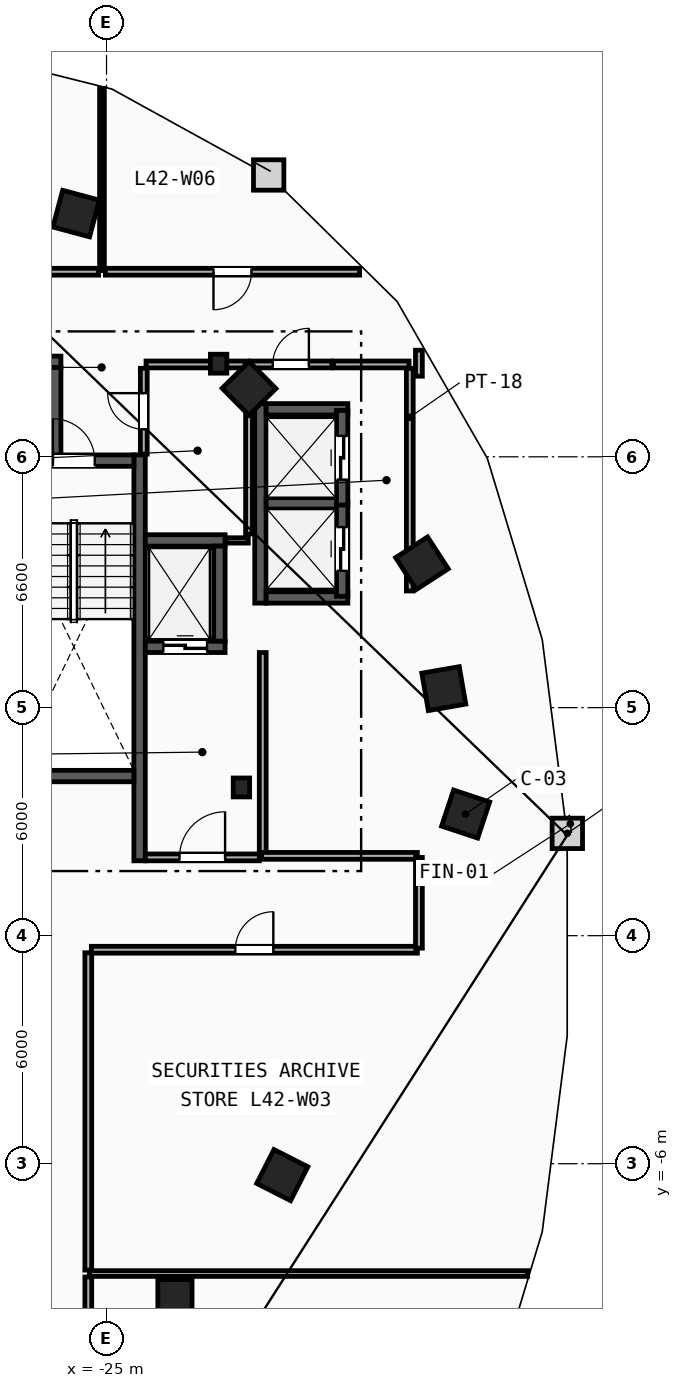
"""IFC4 building model, lengths in metres.
Left out: names, types, materials, properties, quantities, classifications, styles, units other than length and angle.
Written with IfcOpenShell. Run it as: python <this file> out.ifc"""

import sys

from ifc_helpers import new_model, si_unit, direction, frame, frame_2d, origin, origin_2d, place, context, subcontext, project, spatial, rectangle, i_section, extrude, element, fill, save


model = new_model("IFC4")
c1 = context("Model", 3, precision=1e-05, world=origin(), true_north=direction((0.0, 1.0)))
c2 = subcontext(c1, "Body", "Model", "MODEL_VIEW")
j1 = project(units=[si_unit("LENGTHUNIT", "METRE"), si_unit("PLANEANGLEUNIT", "RADIAN")], contexts=[c1])
p1 = place(None, origin())
s1 = spatial("IfcSite", under=j1, at=p1, CompositionType="ELEMENT")
p2 = place(p1, origin())
s2 = spatial("IfcBuilding", under=s1, at=p2, CompositionType="ELEMENT")
p3 = place(p2, frame((0.0, 0.0, 162.0)))
s3 = spatial("IfcBuildingStorey", under=s2, at=p3, CompositionType="ELEMENT", Elevation=162.0)
for number, where, z_axis, x_axis in (
    (1, (-21.45, 3.9, 0.0), (0.0, 0.0, 1.0), (1.0, 0.0, 0.0)),
    (2, (-22.05, 15.05, 0.0), (0.0, 0.0, 1.0), (1.0, 0.0, 0.0)),
):
    element("IfcColumn", number, at=place(p3, frame(where, z_axis=z_axis, x_axis=x_axis)), inside=s3, PredefinedType="COLUMN", context=c2, shape_type="SweptSolid", body=[
        extrude(i_section(OverallWidth=0.432, OverallDepth=0.498, WebThickness=0.056, FlangeThickness=0.089, FilletRadius=0.018, at=origin_2d()), origin(), (0.0, 0.0, 1.0), 3.6),
    ])
p4 = place(p3, frame((-23.2, -9.5, 0.0), z_axis=(0.0, 0.0, 1.0), x_axis=(1.0, 0.0, 0.0)))
e3 = element("IfcColumn", 3, at=p4, inside=s3, PredefinedType="COLUMN", context=c2, shape_type="SweptSolid", body=[
    extrude(rectangle(XDim=0.9, YDim=0.9, at=origin_2d()), origin(), (0.0, 0.0, 1.0), 3.6),
])
for number, where, z_axis, x_axis in (
    (4, (-15.55, 3.2, 0.0), (0.0, 0.0, 1.0), (0.315, 0.949, 0.0)),
    (5, (-16.125, 6.5, 0.0), (0.0, 0.0, 1.0), (-0.172, 0.985, 0.0)),
    (6, (-16.7, 9.8, 0.0), (0.0, 0.0, 1.0), (-0.544, 0.839, 0.0)),
    (7, (-21.25, 14.4, 0.0), (0.0, 0.0, 1.0), (-0.703, 0.711, 0.0)),
    (8, (-25.8, 19.0, 0.0), (0.0, 0.0, 1.0), (-0.966, 0.259, 0.0)),
    (9, (-20.375, -6.3, 0.0), (0.0, 0.0, 1.0), (0.453, 0.892, 0.0)),
):
    element("IfcColumn", number, at=place(p3, frame(where, z_axis=z_axis, x_axis=x_axis)), inside=s3, PredefinedType="COLUMN", context=c2, shape_type="SweptSolid", body=[
        extrude(rectangle(XDim=1.0, YDim=1.0, at=origin_2d()), origin(), (0.0, 0.0, 1.0), 3.6),
    ])
p5 = place(p3, frame((-24.13, 1.97, 0.0), z_axis=(0.0, 0.0, 1.0), x_axis=(0.0, 1.0, 0.0)))
e10 = element("IfcWall", 10, at=p5, inside=s3, PredefinedType="SHEAR", context=c2, shape_type="SweptSolid", body=[
    extrude(rectangle(XDim=10.68, YDim=0.3, at=frame_2d((5.34, 0.0))), origin(), (0.0, 0.0, 1.0), 3.36),
])
p6 = place(p3, frame((-27.44, 12.5, 0.0), z_axis=(0.0, 0.0, 1.0), x_axis=(1.0, 0.0, 0.0)))
e11 = element("IfcWall", 11, at=p6, inside=s3, PredefinedType="SHEAR", context=c2, shape_type="SweptSolid", body=[
    extrude(rectangle(XDim=3.16, YDim=0.3, at=frame_2d((1.58, 0.0))), origin(), (0.0, 0.0, 1.0), 3.36),
])
p7 = place(p6, frame((1.03, 0.0, 0.0)))
e12 = element("IfcOpeningElement", 12, at=p7, cuts=e11, PredefinedType="OPENING", context=c2, shape_type="SweptSolid", body=[
    extrude(rectangle(XDim=1.1, YDim=2.15, at=frame_2d((0.55, 1.075))), frame((0.0, 0.16, 0.0), z_axis=(0.0, -1.0, 0.0), x_axis=(1.0, 0.0, 0.0)), (0.0, 0.0, 1.0), 0.32),
])
p8 = place(p3, frame((-27.44, 4.2, 0.0), z_axis=(0.0, 0.0, 1.0), x_axis=(1.0, 0.0, 0.0)))
e13 = element("IfcWall", 13, at=p8, inside=s3, PredefinedType="SHEAR", context=c2, shape_type="SweptSolid", body=[
    extrude(rectangle(XDim=3.16, YDim=0.3, at=frame_2d((1.58, 0.0))), origin(), (0.0, 0.0, 1.0), 3.36),
])
p9 = place(p3, frame((-20.89, 2.15, 0.0), z_axis=(0.0, 0.0, 1.0), x_axis=(0.0, 1.0, 0.0)))
e14 = element("IfcWall", 14, at=p9, inside=s3, PredefinedType="PARTITIONING", context=c2, shape_type="SweptSolid", body=[
    extrude(rectangle(XDim=5.3, YDim=0.18, at=frame_2d((2.65, 0.0))), origin(), (0.0, 0.0, 1.0), 3.36),
])
p10 = place(p3, frame((-23.98, 2.06, 0.0), z_axis=(0.0, 0.0, 1.0), x_axis=(1.0, 0.0, 0.0)))
e15 = element("IfcWall", 15, at=p10, inside=s3, PredefinedType="PARTITIONING", context=c2, shape_type="SweptSolid", body=[
    extrude(rectangle(XDim=3.0, YDim=0.18, at=frame_2d((1.5, 0.0))), origin(), (0.0, 0.0, 1.0), 3.36),
])
p11 = place(p10, frame((0.9, 0.0, 0.0)))
e16 = element("IfcOpeningElement", 16, at=p11, cuts=e15, PredefinedType="OPENING", context=c2, shape_type="SweptSolid", body=[
    extrude(rectangle(XDim=1.2, YDim=2.15, at=frame_2d((0.6, 1.075))), frame((0.0, 0.1, 0.0), z_axis=(0.0, -1.0, 0.0), x_axis=(1.0, 0.0, 0.0)), (0.0, 0.0, 1.0), 0.2),
])
p12 = place(p3, frame((-23.98, 7.6, 0.0), z_axis=(0.0, 0.0, 1.0), x_axis=(1.0, 0.0, 0.0)))
e17 = element("IfcWall", 17, at=p12, inside=s3, PredefinedType="SHEAR", context=c2, shape_type="SweptSolid", body=[
    extrude(rectangle(XDim=2.1, YDim=0.3, at=frame_2d((1.05, 0.0))), origin(), (0.0, 0.0, 1.0), 3.36),
])
p13 = place(p12, frame((0.475, 0.0, 0.0)))
e18 = element("IfcOpeningElement", 18, at=p13, cuts=e17, PredefinedType="OPENING", context=c2, shape_type="SweptSolid", body=[
    extrude(rectangle(XDim=1.15, YDim=2.2, at=frame_2d((0.575, 1.1))), frame((0.0, 0.16, 0.0), z_axis=(0.0, -1.0, 0.0), x_axis=(1.0, 0.0, 0.0)), (0.0, 0.0, 1.0), 0.32),
])
p14 = place(p3, frame((-23.98, 10.4, 0.0), z_axis=(0.0, 0.0, 1.0), x_axis=(1.0, 0.0, 0.0)))
e19 = element("IfcWall", 19, at=p14, inside=s3, PredefinedType="SHEAR", context=c2, shape_type="SweptSolid", body=[
    extrude(rectangle(XDim=2.1, YDim=0.3, at=frame_2d((1.05, 0.0))), origin(), (0.0, 0.0, 1.0), 3.36),
])
for number, where, z_axis, x_axis in (
    (20, (-22.03, 7.75, 0.0), (0.0, 0.0, 1.0), (0.0, 1.0, 0.0)),
    (21, (-28.7, 15.1, 0.0), (0.0, 0.0, 1.0), (1.0, 0.0, 0.0)),
):
    element("IfcWall", number, at=place(p3, frame(where, z_axis=z_axis, x_axis=x_axis)), inside=s3, PredefinedType="SHEAR", context=c2, shape_type="SweptSolid", body=[
        extrude(rectangle(XDim=2.5, YDim=0.3, at=frame_2d((1.25, 0.0))), origin(), (0.0, 0.0, 1.0), 3.36),
    ])
p15 = place(p3, frame((-26.35, 12.65, 0.0), z_axis=(0.0, 0.0, 1.0), x_axis=(0.0, 1.0, 0.0)))
e22 = element("IfcWall", 22, at=p15, inside=s3, PredefinedType="SHEAR", context=c2, shape_type="SweptSolid", body=[
    extrude(rectangle(XDim=2.3, YDim=0.3, at=frame_2d((1.15, 0.0))), origin(), (0.0, 0.0, 1.0), 3.36),
])
p16 = place(p3, frame((-20.95, 8.75, 0.0), z_axis=(0.0, 0.0, 1.0), x_axis=(0.0, 1.0, 0.0)))
e23 = element("IfcWall", 23, at=p16, inside=s3, PredefinedType="SHEAR", context=c2, shape_type="SweptSolid", body=[
    extrude(rectangle(XDim=5.25, YDim=0.3, at=frame_2d((2.625, 0.0))), origin(), (0.0, 0.0, 1.0), 3.36),
])
for number, where, z_axis, x_axis in (
    (24, (-20.8, 8.9, 0.0), (0.0, 0.0, 1.0), (1.0, 0.0, 0.0)),
    (25, (-20.8, 13.85, 0.0), (0.0, 0.0, 1.0), (1.0, 0.0, 0.0)),
):
    element("IfcWall", number, at=place(p3, frame(where, z_axis=z_axis, x_axis=x_axis)), inside=s3, PredefinedType="SHEAR", context=c2, shape_type="SweptSolid", body=[
        extrude(rectangle(XDim=2.15, YDim=0.3, at=frame_2d((1.075, 0.0))), origin(), (0.0, 0.0, 1.0), 3.36),
    ])
p17 = place(p3, frame((-20.8, 11.375, 0.0), z_axis=(0.0, 0.0, 1.0), x_axis=(1.0, 0.0, 0.0)))
e26 = element("IfcWall", 26, at=p17, inside=s3, PredefinedType="SHEAR", context=c2, shape_type="SweptSolid", body=[
    extrude(rectangle(XDim=1.85, YDim=0.3, at=frame_2d((0.925, 0.0))), origin(), (0.0, 0.0, 1.0), 3.36),
])
p18 = place(p3, frame((-18.8, 8.93, 0.0), z_axis=(0.0, 0.0, 1.0), x_axis=(0.0, 1.0, 0.0)))
e27 = element("IfcWall", 27, at=p18, inside=s3, PredefinedType="SHEAR", context=c2, shape_type="SweptSolid", body=[
    extrude(rectangle(XDim=2.49, YDim=0.3, at=frame_2d((1.245, 0.0))), origin(), (0.0, 0.0, 1.0), 3.36),
])
p19 = place(p18, frame((0.67, 0.0, 0.0)))
e28 = element("IfcOpeningElement", 28, at=p19, cuts=e27, PredefinedType="OPENING", context=c2, shape_type="SweptSolid", body=[
    extrude(rectangle(XDim=1.15, YDim=2.2, at=frame_2d((0.575, 1.1))), frame((0.0, 0.16, 0.0), z_axis=(0.0, -1.0, 0.0), x_axis=(1.0, 0.0, 0.0)), (0.0, 0.0, 1.0), 0.32),
])
p20 = place(p3, frame((-18.8, 11.33, 0.0), z_axis=(0.0, 0.0, 1.0), x_axis=(0.0, 1.0, 0.0)))
e29 = element("IfcWall", 29, at=p20, inside=s3, PredefinedType="SHEAR", context=c2, shape_type="SweptSolid", body=[
    extrude(rectangle(XDim=2.49, YDim=0.3, at=frame_2d((1.245, 0.0))), origin(), (0.0, 0.0, 1.0), 3.36),
])
p21 = place(p20, frame((0.67, 0.0, 0.0)))
e30 = element("IfcOpeningElement", 30, at=p21, cuts=e29, PredefinedType="OPENING", context=c2, shape_type="SweptSolid", body=[
    extrude(rectangle(XDim=1.15, YDim=2.2, at=frame_2d((0.575, 1.1))), frame((0.0, 0.16, 0.0), z_axis=(0.0, -1.0, 0.0), x_axis=(1.0, 0.0, 0.0)), (0.0, 0.0, 1.0), 0.32),
])
p22 = place(p3, frame((-17.02, 9.07, 0.0), z_axis=(0.0, 0.0, 1.0), x_axis=(0.0, 1.0, 0.0)))
e31 = element("IfcWall", 31, at=p22, inside=s3, PredefinedType="PARTITIONING", context=c2, shape_type="SweptSolid", body=[
    extrude(rectangle(XDim=5.86, YDim=0.18, at=frame_2d((2.93, 0.0))), origin(), (0.0, 0.0, 1.0), 3.36),
])
p23 = place(p3, frame((-21.23, 15.03, 0.0), z_axis=(0.0, 0.0, 1.0), x_axis=(1.0, 0.0, 0.0)))
e32 = element("IfcWall", 32, at=p23, inside=s3, PredefinedType="PARTITIONING", context=c2, shape_type="SweptSolid", body=[
    extrude(rectangle(XDim=2.16, YDim=0.18, at=frame_2d((1.08, 0.0))), origin(), (0.0, 0.0, 1.0), 3.36),
])
p24 = place(p23, frame((0.605, 0.0, 0.0)))
e33 = element("IfcOpeningElement", 33, at=p24, cuts=e32, PredefinedType="OPENING", context=c2, shape_type="SweptSolid", body=[
    extrude(rectangle(XDim=0.95, YDim=2.1, at=frame_2d((0.475, 1.05))), frame((0.0, 0.1, 0.0), z_axis=(0.0, -1.0, 0.0), x_axis=(1.0, 0.0, 0.0)), (0.0, 0.0, 1.0), 0.2),
])
p25 = place(p3, frame((-19.03, 15.03, 0.0), z_axis=(0.0, 0.0, 1.0), x_axis=(1.0, 0.0, 0.0)))
e34 = element("IfcWall", 34, at=p25, inside=s3, PredefinedType="PARTITIONING", context=c2, shape_type="SweptSolid", body=[
    extrude(rectangle(XDim=1.99, YDim=0.18, at=frame_2d((0.995, 0.0))), origin(), (0.0, 0.0, 1.0), 3.36),
])
p26 = place(p3, frame((-21.86, 10.4, 0.0), z_axis=(0.0, 0.0, 1.0), x_axis=(1.0, 0.0, 0.0)))
e35 = element("IfcWall", 35, at=p26, inside=s3, PredefinedType="PARTITIONING", context=c2, shape_type="SweptSolid", body=[
    extrude(rectangle(XDim=0.59, YDim=0.14, at=frame_2d((0.295, 0.0))), origin(), (0.0, 0.0, 1.0), 3.36),
])
p27 = place(p3, frame((-21.25, 10.57, 0.0), z_axis=(0.0, 0.0, 1.0), x_axis=(0.0, 1.0, 0.0)))
e36 = element("IfcWall", 36, at=p27, inside=s3, PredefinedType="PARTITIONING", context=c2, shape_type="SweptSolid", body=[
    extrude(rectangle(XDim=4.36, YDim=0.18, at=frame_2d((2.18, 0.0))), origin(), (0.0, 0.0, 1.0), 3.36),
])
p28 = place(p3, frame((-23.96, 15.03, 0.0), z_axis=(0.0, 0.0, 1.0), x_axis=(1.0, 0.0, 0.0)))
e37 = element("IfcWall", 37, at=p28, inside=s3, PredefinedType="PARTITIONING", context=c2, shape_type="SweptSolid", body=[
    extrude(rectangle(XDim=2.61, YDim=0.18, at=frame_2d((1.305, 0.0))), origin(), (0.0, 0.0, 1.0), 2.433),
])
p29 = place(p3, frame((-24.02, 12.67, 0.0), z_axis=(0.0, 0.0, 1.0), x_axis=(0.0, 1.0, 0.0)))
e38 = element("IfcWall", 38, at=p29, inside=s3, PredefinedType="PARTITIONING", context=c2, shape_type="SweptSolid", body=[
    extrude(rectangle(XDim=2.26, YDim=0.18, at=frame_2d((1.13, 0.0))), origin(), (0.0, 0.0, 1.0), 3.36),
])
p30 = place(p29, frame((0.655, 0.0, 0.0)))
e39 = element("IfcOpeningElement", 39, at=p30, cuts=e38, PredefinedType="OPENING", context=c2, shape_type="SweptSolid", body=[
    extrude(rectangle(XDim=0.95, YDim=2.1, at=frame_2d((0.475, 1.05))), frame((0.0, 0.1, 0.0), z_axis=(0.0, -1.0, 0.0), x_axis=(1.0, 0.0, 0.0)), (0.0, 0.0, 1.0), 0.2),
])
p31 = place(p3, frame((-25.45, -8.89, 0.0), z_axis=(0.0, 0.0, 1.0), x_axis=(1.0, 0.0, 0.0)))
e40 = element("IfcWall", 40, at=p31, inside=s3, PredefinedType="PARTITIONING", context=c2, shape_type="SweptSolid", body=[
    extrude(rectangle(XDim=11.532, YDim=0.15, at=frame_2d((5.766, 0.0))), origin(), (0.0, 0.0, 1.0), 3.36),
])
p32 = place(p3, frame((-25.12, 17.5, 0.0), z_axis=(0.0, 0.0, 1.0), x_axis=(0.0, 1.0, 0.0)))
e41 = element("IfcWall", 41, at=p32, inside=s3, PredefinedType="PARTITIONING", context=c2, shape_type="SweptSolid", body=[
    extrude(rectangle(XDim=4.791, YDim=0.125, at=frame_2d((2.396, 0.0))), origin(), (0.0, 0.0, 1.0), 3.36),
])
p33 = place(p3, frame((-25.48, -11.178, 0.0), z_axis=(0.0, 0.0, 1.0), x_axis=(0.0, 1.0, 0.0)))
e42 = element("IfcWall", 42, at=p33, inside=s3, PredefinedType="PARTITIONING", context=c2, shape_type="SweptSolid", body=[
    extrude(rectangle(XDim=2.198, YDim=0.18, at=frame_2d((1.099, 0.0))), origin(), (0.0, 0.0, 1.0), 3.36),
])
p34 = place(p3, frame((-25.4, -0.37, 0.0), z_axis=(0.0, 0.0, 1.0), x_axis=(1.0, 0.0, 0.0)))
e43 = element("IfcWall", 43, at=p34, inside=s3, PredefinedType="PARTITIONING", context=c2, shape_type="SweptSolid", body=[
    extrude(rectangle(XDim=8.578, YDim=0.18, at=frame_2d((4.289, 0.0))), origin(), (0.0, 0.0, 1.0), 3.36),
])
p35 = place(p34, frame((3.789, 0.0, 0.0)))
e44 = element("IfcOpeningElement", 44, at=p35, cuts=e43, PredefinedType="OPENING", context=c2, shape_type="SweptSolid", body=[
    extrude(rectangle(XDim=1.0, YDim=2.15, at=frame_2d((0.5, 1.075))), frame((0.0, 0.1, 0.0), z_axis=(0.0, -1.0, 0.0), x_axis=(1.0, 0.0, 0.0)), (0.0, 0.0, 1.0), 0.2),
])
p36 = place(p3, frame((-25.48, -8.8, 0.0), z_axis=(0.0, 0.0, 1.0), x_axis=(0.0, 1.0, 0.0)))
e45 = element("IfcWall", 45, at=p36, inside=s3, PredefinedType="PARTITIONING", context=c2, shape_type="SweptSolid", body=[
    extrude(rectangle(XDim=8.35, YDim=0.18, at=frame_2d((4.175, 0.0))), origin(), (0.0, 0.0, 1.0), 3.36),
])
p37 = place(p3, frame((-16.822, 2.1, 0.0), z_axis=(0.0, 0.0, 1.0), x_axis=(-1.0, 0.0, 0.0)))
e46 = element("IfcWall", 46, at=p37, inside=s3, PredefinedType="PARTITIONING", context=c2, shape_type="SweptSolid", body=[
    extrude(rectangle(XDim=4.098, YDim=0.18, at=frame_2d((2.049, 0.0))), origin(), (0.0, 0.0, 1.0), 3.36),
])
p38 = place(p3, frame((-16.78, -0.329, 0.0), z_axis=(0.0, 0.0, 1.0), x_axis=(0.0, 1.0, 0.0)))
e47 = element("IfcWall", 47, at=p38, inside=s3, PredefinedType="PARTITIONING", context=c2, shape_type="SweptSolid", body=[
    extrude(rectangle(XDim=2.387, YDim=0.18, at=frame_2d((1.194, 0.0))), origin(), (0.0, 0.0, 1.0), 3.36),
])
p39 = place(p3, frame((-16.78, 14.721, 0.0), z_axis=(0.0, 0.0, 1.0), x_axis=(0.0, 1.0, 0.0)))
e48 = element("IfcWall", 48, at=p39, inside=s3, PredefinedType="PARTITIONING", context=c2, shape_type="SweptSolid", body=[
    extrude(rectangle(XDim=0.684, YDim=0.18, at=frame_2d((0.342, 0.0))), origin(), (0.0, 0.0, 1.0), 3.36),
])
p40 = place(p3, frame((-18.342, 17.47, 0.0), z_axis=(0.0, 0.0, 1.0), x_axis=(-1.0, 0.0, 0.0)))
e49 = element("IfcWall", 49, at=p40, inside=s3, PredefinedType="PARTITIONING", context=c2, shape_type="SweptSolid", body=[
    extrude(rectangle(XDim=6.688, YDim=0.18, at=frame_2d((3.344, 0.0))), origin(), (0.0, 0.0, 1.0), 3.36),
])
p41 = place(p40, frame((2.844, 0.0, 0.0)))
e50 = element("IfcOpeningElement", 50, at=p41, cuts=e49, PredefinedType="OPENING", context=c2, shape_type="SweptSolid", body=[
    extrude(rectangle(XDim=1.0, YDim=2.15, at=frame_2d((0.5, 1.075))), frame((0.0, 0.1, 0.0), z_axis=(0.0, -1.0, 0.0), x_axis=(1.0, 0.0, 0.0)), (0.0, 0.0, 1.0), 0.2),
])
p42 = place(p3, frame((-25.21, 17.47, 0.0), z_axis=(0.0, 0.0, 1.0), x_axis=(-1.0, 0.0, 0.0)))
e51 = element("IfcWall", 51, at=p42, inside=s3, PredefinedType="PARTITIONING", context=c2, shape_type="SweptSolid", body=[
    extrude(rectangle(XDim=5.42, YDim=0.18, at=frame_2d((2.71, 0.0))), origin(), (0.0, 0.0, 1.0), 3.36),
])
p43 = place(p42, frame((2.21, 0.0, 0.0)))
e52 = element("IfcOpeningElement", 52, at=p43, cuts=e51, PredefinedType="OPENING", context=c2, shape_type="SweptSolid", body=[
    extrude(rectangle(XDim=1.0, YDim=2.15, at=frame_2d((0.5, 1.075))), frame((0.0, 0.1, 0.0), z_axis=(0.0, -1.0, 0.0), x_axis=(1.0, 0.0, 0.0)), (0.0, 0.0, 1.0), 0.2),
])
p44 = place(p7, origin())
e53 = element("IfcDoor", 53, at=p44, inside=s3, OperationType="SINGLE_SWING_LEFT", PredefinedType="DOOR", context=c2, shape_type="SweptSolid", body=[
    extrude(rectangle(XDim=1.1, YDim=2.15, at=frame_2d((0.55, 1.075))), frame((0.0, 0.025, 0.0), z_axis=(0.0, -1.0, 0.0), x_axis=(1.0, 0.0, 0.0)), (0.0, 0.0, 1.0), 0.05),
])
fill(e12, e53)
p45 = place(p11, origin())
e54 = element("IfcDoor", 54, at=p45, inside=s3, OperationType="SINGLE_SWING_RIGHT", PredefinedType="DOOR", context=c2, shape_type="SweptSolid", body=[
    extrude(rectangle(XDim=1.2, YDim=2.15, at=frame_2d((0.6, 1.075))), frame((0.0, 0.025, 0.0), z_axis=(0.0, -1.0, 0.0), x_axis=(1.0, 0.0, 0.0)), (0.0, 0.0, 1.0), 0.05),
])
fill(e16, e54)
p46 = place(p13, origin())
e55 = element("IfcDoor", 55, at=p46, inside=s3, OperationType="SLIDING_TO_LEFT", PredefinedType="TRAPDOOR", context=c2, shape_type="SweptSolid", body=[
    extrude(rectangle(XDim=1.15, YDim=2.2, at=frame_2d((0.575, 1.1))), frame((0.0, 0.025, 0.0), z_axis=(0.0, -1.0, 0.0), x_axis=(1.0, 0.0, 0.0)), (0.0, 0.0, 1.0), 0.05),
])
fill(e18, e55)
p47 = place(p19, origin())
e56 = element("IfcDoor", 56, at=p47, inside=s3, OperationType="SLIDING_TO_LEFT", PredefinedType="TRAPDOOR", context=c2, shape_type="SweptSolid", body=[
    extrude(rectangle(XDim=1.15, YDim=2.2, at=frame_2d((0.575, 1.1))), frame((0.0, 0.025, 0.0), z_axis=(0.0, -1.0, 0.0), x_axis=(1.0, 0.0, 0.0)), (0.0, 0.0, 1.0), 0.05),
])
fill(e28, e56)
p48 = place(p21, origin())
e57 = element("IfcDoor", 57, at=p48, inside=s3, OperationType="SLIDING_TO_LEFT", PredefinedType="TRAPDOOR", context=c2, shape_type="SweptSolid", body=[
    extrude(rectangle(XDim=1.15, YDim=2.2, at=frame_2d((0.575, 1.1))), frame((0.0, 0.025, 0.0), z_axis=(0.0, -1.0, 0.0), x_axis=(1.0, 0.0, 0.0)), (0.0, 0.0, 1.0), 0.05),
])
fill(e30, e57)
p49 = place(p35, origin())
e58 = element("IfcDoor", 58, at=p49, inside=s3, OperationType="SINGLE_SWING_RIGHT", PredefinedType="DOOR", context=c2, shape_type="SweptSolid", body=[
    extrude(rectangle(XDim=1.0, YDim=2.15, at=frame_2d((0.5, 1.075))), frame((0.0, 0.025, 0.0), z_axis=(0.0, -1.0, 0.0), x_axis=(1.0, 0.0, 0.0)), (0.0, 0.0, 1.0), 0.05),
])
fill(e44, e58)
p50 = place(p41, origin())
e59 = element("IfcDoor", 59, at=p50, inside=s3, OperationType="SINGLE_SWING_RIGHT", PredefinedType="DOOR", context=c2, shape_type="SweptSolid", body=[
    extrude(rectangle(XDim=1.0, YDim=2.15, at=frame_2d((0.5, 1.075))), frame((0.0, 0.025, 0.0), z_axis=(0.0, -1.0, 0.0), x_axis=(1.0, 0.0, 0.0)), (0.0, 0.0, 1.0), 0.05),
])
fill(e50, e59)
p51 = place(p30, origin())
e60 = element("IfcDoor", 60, at=p51, inside=s3, OperationType="SINGLE_SWING_RIGHT", PredefinedType="DOOR", context=c2, shape_type="SweptSolid", body=[
    extrude(rectangle(XDim=0.95, YDim=2.1, at=frame_2d((0.475, 1.05))), frame((0.0, 0.025, 0.0), z_axis=(0.0, -1.0, 0.0), x_axis=(1.0, 0.0, 0.0)), (0.0, 0.0, 1.0), 0.05),
])
fill(e39, e60)
p52 = place(p24, origin())
e61 = element("IfcDoor", 61, at=p52, inside=s3, OperationType="SINGLE_SWING_RIGHT", PredefinedType="DOOR", context=c2, shape_type="SweptSolid", body=[
    extrude(rectangle(XDim=0.95, YDim=2.1, at=frame_2d((0.475, 1.05))), frame((0.0, 0.025, 0.0), z_axis=(0.0, -1.0, 0.0), x_axis=(1.0, 0.0, 0.0)), (0.0, 0.0, 1.0), 0.05),
])
fill(e33, e61)
save(model, sys.argv[1])
